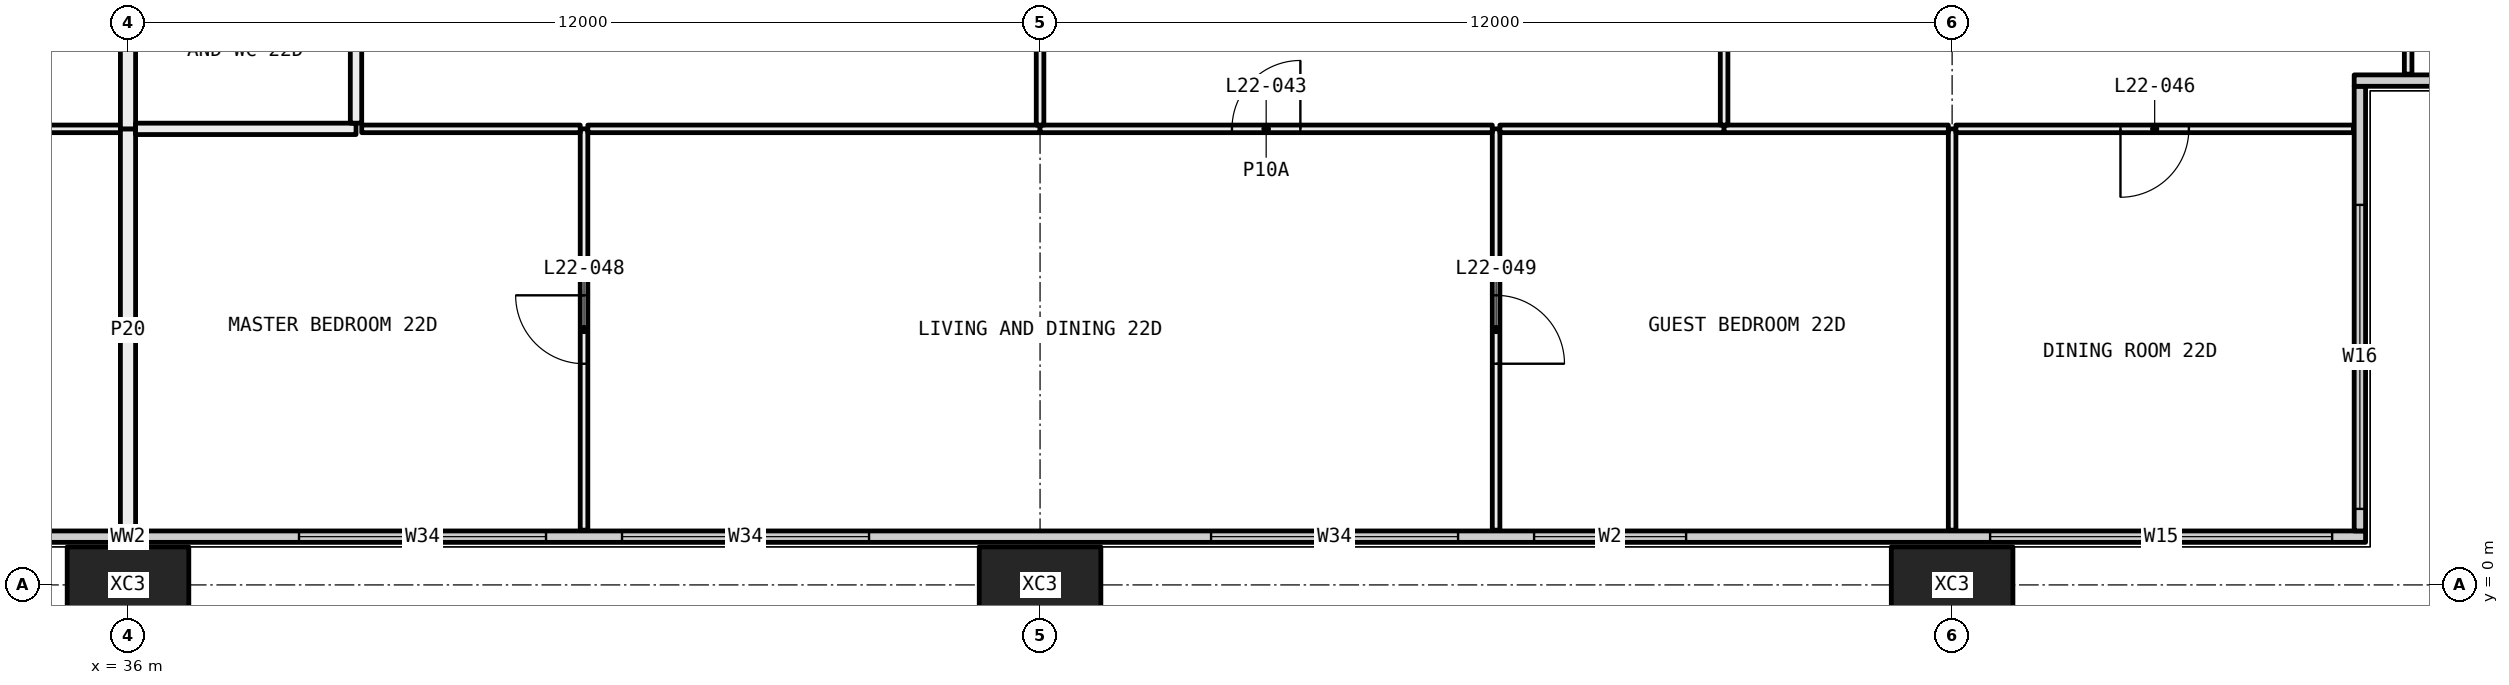
"""IFC4 building model, lengths in metres.
Left out: names, types, materials, properties, quantities, classifications, styles, units other than length and angle.
Written with IfcOpenShell. Run it as: python <this file> out.ifc"""

import sys

from ifc_helpers import new_model, si_unit, direction, frame, frame_2d, origin, origin_2d, place, context, subcontext, project, spatial, rectangle, hollow_rectangle, extrude, element, fill, save


model = new_model("IFC4")
c1 = context("Model", 3, precision=1e-05, world=origin(), true_north=direction((0.0, 1.0)))
c2 = subcontext(c1, "Body", "Model", "MODEL_VIEW")
j1 = project(units=[si_unit("LENGTHUNIT", "METRE"), si_unit("PLANEANGLEUNIT", "RADIAN")], contexts=[c1])
p1 = place(None, origin())
s1 = spatial("IfcSite", under=j1, at=p1, CompositionType="ELEMENT")
p2 = place(p1, origin())
s2 = spatial("IfcBuilding", under=s1, at=p2, CompositionType="ELEMENT")
p3 = place(p2, frame((0.0, 0.0, 88.65)))
s3 = spatial("IfcBuildingStorey", under=s2, at=p3, CompositionType="ELEMENT", Elevation=88.65)
for number, where, z_axis, x_axis in (
    (1, (36.0, 0.0, -0.4), (0.0, 0.0, 1.0), (1.0, 0.0, 0.0)),
    (2, (48.0, 0.0, -0.4), (0.0, 0.0, 1.0), (1.0, 0.0, 0.0)),
    (3, (60.0, 0.0, -0.4), (0.0, 0.0, 1.0), (1.0, 0.0, 0.0)),
):
    element("IfcColumn", number, at=place(p3, frame(where, z_axis=z_axis, x_axis=x_axis)), inside=s3, PredefinedType="COLUMN", context=c2, shape_type="SweptSolid", body=[
        extrude(hollow_rectangle(XDim=1.6, YDim=1.0, WallThickness=0.065, at=origin_2d()), origin(), (0.0, 0.0, 1.0), 3.45),
    ])
p4 = place(p3, frame((6.56, 0.635, 0.0), z_axis=(0.0, 0.0, 1.0), x_axis=(1.0, 0.0, 0.0)))
e4 = element("IfcWall", 4, at=p4, inside=s3, PredefinedType="ELEMENTEDWALL", context=c2, shape_type="SweptSolid", body=[
    extrude(rectangle(XDim=58.88, YDim=0.15, at=frame_2d((29.44, 0.0))), origin(), (0.0, 0.0, 1.0), 3.05),
])
p5 = place(p4, frame((0.44, 0.0, 0.45)))
e5 = element("IfcOpeningElement", 5, at=p5, cuts=e4, PredefinedType="OPENING", context=c2, shape_type="SweptSolid", body=[
    extrude(rectangle(XDim=4.5, YDim=2.55, at=frame_2d((2.25, 1.275))), frame((0.0, 0.085, 0.0), z_axis=(0.0, -1.0, 0.0), x_axis=(1.0, 0.0, 0.0)), (0.0, 0.0, 1.0), 0.17),
])
p6 = place(p4, frame((7.69, 0.0, 0.45)))
e6 = element("IfcOpeningElement", 6, at=p6, cuts=e4, PredefinedType="OPENING", context=c2, shape_type="SweptSolid", body=[
    extrude(rectangle(XDim=3.25, YDim=2.55, at=frame_2d((1.625, 1.275))), frame((0.0, 0.085, 0.0), z_axis=(0.0, -1.0, 0.0), x_axis=(1.0, 0.0, 0.0)), (0.0, 0.0, 1.0), 0.17),
])
p7 = place(p4, frame((11.94, 0.0, 0.45)))
e7 = element("IfcOpeningElement", 7, at=p7, cuts=e4, PredefinedType="OPENING", context=c2, shape_type="SweptSolid", body=[
    extrude(rectangle(XDim=3.25, YDim=2.55, at=frame_2d((1.625, 1.275))), frame((0.0, 0.085, 0.0), z_axis=(0.0, -1.0, 0.0), x_axis=(1.0, 0.0, 0.0)), (0.0, 0.0, 1.0), 0.17),
])
p8 = place(p4, frame((19.69, 0.0, 0.45)))
e8 = element("IfcOpeningElement", 8, at=p8, cuts=e4, PredefinedType="OPENING", context=c2, shape_type="SweptSolid", body=[
    extrude(rectangle(XDim=3.25, YDim=2.55, at=frame_2d((1.625, 1.275))), frame((0.0, 0.085, 0.0), z_axis=(0.0, -1.0, 0.0), x_axis=(1.0, 0.0, 0.0)), (0.0, 0.0, 1.0), 0.17),
])
p9 = place(p4, frame((23.94, 0.0, 0.45)))
e9 = element("IfcOpeningElement", 9, at=p9, cuts=e4, PredefinedType="OPENING", context=c2, shape_type="SweptSolid", body=[
    extrude(rectangle(XDim=2.0, YDim=2.55, at=frame_2d((1.0, 1.275))), frame((0.0, 0.085, 0.0), z_axis=(0.0, -1.0, 0.0), x_axis=(1.0, 0.0, 0.0)), (0.0, 0.0, 1.0), 0.17),
])
p10 = place(p4, frame((31.69, 0.0, 0.45)))
e10 = element("IfcOpeningElement", 10, at=p10, cuts=e4, PredefinedType="OPENING", context=c2, shape_type="SweptSolid", body=[
    extrude(rectangle(XDim=3.25, YDim=2.55, at=frame_2d((1.625, 1.275))), frame((0.0, 0.085, 0.0), z_axis=(0.0, -1.0, 0.0), x_axis=(1.0, 0.0, 0.0)), (0.0, 0.0, 1.0), 0.17),
])
p11 = place(p4, frame((35.94, 0.0, 0.45)))
e11 = element("IfcOpeningElement", 11, at=p11, cuts=e4, PredefinedType="OPENING", context=c2, shape_type="SweptSolid", body=[
    extrude(rectangle(XDim=3.25, YDim=2.55, at=frame_2d((1.625, 1.275))), frame((0.0, 0.085, 0.0), z_axis=(0.0, -1.0, 0.0), x_axis=(1.0, 0.0, 0.0)), (0.0, 0.0, 1.0), 0.17),
])
p12 = place(p4, frame((43.69, 0.0, 0.45)))
e12 = element("IfcOpeningElement", 12, at=p12, cuts=e4, PredefinedType="OPENING", context=c2, shape_type="SweptSolid", body=[
    extrude(rectangle(XDim=3.25, YDim=2.55, at=frame_2d((1.625, 1.275))), frame((0.0, 0.085, 0.0), z_axis=(0.0, -1.0, 0.0), x_axis=(1.0, 0.0, 0.0)), (0.0, 0.0, 1.0), 0.17),
])
p13 = place(p4, frame((47.94, 0.0, 0.45)))
e13 = element("IfcOpeningElement", 13, at=p13, cuts=e4, PredefinedType="OPENING", context=c2, shape_type="SweptSolid", body=[
    extrude(rectangle(XDim=2.0, YDim=2.55, at=frame_2d((1.0, 1.275))), frame((0.0, 0.085, 0.0), z_axis=(0.0, -1.0, 0.0), x_axis=(1.0, 0.0, 0.0)), (0.0, 0.0, 1.0), 0.17),
])
p14 = place(p4, frame((53.94, 0.0, 0.45)))
e14 = element("IfcOpeningElement", 14, at=p14, cuts=e4, PredefinedType="OPENING", context=c2, shape_type="SweptSolid", body=[
    extrude(rectangle(XDim=4.5, YDim=2.55, at=frame_2d((2.25, 1.275))), frame((0.0, 0.085, 0.0), z_axis=(0.0, -1.0, 0.0), x_axis=(1.0, 0.0, 0.0)), (0.0, 0.0, 1.0), 0.17),
])
p15 = place(p3, frame((65.365, 0.71, 0.0), z_axis=(0.0, 0.0, 1.0), x_axis=(0.0, 1.0, 0.0)))
e15 = element("IfcWall", 15, at=p15, inside=s3, PredefinedType="ELEMENTEDWALL", context=c2, shape_type="SweptSolid", body=[
    extrude(rectangle(XDim=5.85, YDim=0.15, at=frame_2d((2.925, 0.0))), origin(), (0.0, 0.0, 1.0), 3.05),
])
p16 = place(p15, frame((0.29, 0.0, 0.45)))
e16 = element("IfcOpeningElement", 16, at=p16, cuts=e15, PredefinedType="OPENING", context=c2, shape_type="SweptSolid", body=[
    extrude(rectangle(XDim=4.0, YDim=2.55, at=frame_2d((2.0, 1.275))), frame((0.0, 0.085, 0.0), z_axis=(0.0, -1.0, 0.0), x_axis=(1.0, 0.0, 0.0)), (0.0, 0.0, 1.0), 0.17),
])
p17 = place(p3, frame((65.29, 6.635, 0.0), z_axis=(0.0, 0.0, 1.0), x_axis=(1.0, 0.0, 0.0)))
e17 = element("IfcWall", 17, at=p17, inside=s3, PredefinedType="ELEMENTEDWALL", context=c2, shape_type="SweptSolid", body=[
    extrude(rectangle(XDim=6.15, YDim=0.15, at=frame_2d((3.075, 0.0))), origin(), (0.0, 0.0, 1.0), 3.05),
])
p18 = place(p17, frame((1.71, 0.0, 0.45)))
e18 = element("IfcOpeningElement", 18, at=p18, cuts=e17, PredefinedType="OPENING", context=c2, shape_type="SweptSolid", body=[
    extrude(rectangle(XDim=4.0, YDim=2.55, at=frame_2d((2.0, 1.275))), frame((0.0, 0.085, 0.0), z_axis=(0.0, -1.0, 0.0), x_axis=(1.0, 0.0, 0.0)), (0.0, 0.0, 1.0), 0.17),
])
p19 = place(p3, frame((35.9, 6.0, 0.0), z_axis=(0.0, 0.0, 1.0), x_axis=(-1.0, 0.0, 0.0)))
e19 = element("IfcWall", 19, at=p19, inside=s3, PredefinedType="PARTITIONING", context=c2, shape_type="SweptSolid", body=[
    extrude(rectangle(XDim=2.9, YDim=0.1, at=frame_2d((1.45, 0.0))), origin(), (0.0, 0.0, 1.0), 3.05),
])
p20 = place(p3, frame((36.0, 0.72, 0.0), z_axis=(0.0, 0.0, 1.0), x_axis=(0.0, 1.0, 0.0)))
e20 = element("IfcWall", 20, at=p20, inside=s3, PredefinedType="PARTITIONING", context=c2, shape_type="SweptSolid", body=[
    extrude(rectangle(XDim=5.28, YDim=0.2, at=frame_2d((2.64, 0.0))), origin(), (0.0, 0.0, 1.0), 2.45),
])
p21 = place(p3, frame((36.0, 6.0, 0.0), z_axis=(0.0, 0.0, 1.0), x_axis=(0.0, 1.0, 0.0)))
e21 = element("IfcWall", 21, at=p21, inside=s3, PredefinedType="PARTITIONING", context=c2, shape_type="SweptSolid", body=[
    extrude(rectangle(XDim=5.2, YDim=0.2, at=frame_2d((2.6, 0.0))), origin(), (0.0, 0.0, 1.0), 2.45),
])
p22 = place(p3, frame((42.0, 0.72, 0.0), z_axis=(0.0, 0.0, 1.0), x_axis=(0.0, 1.0, 0.0)))
e22 = element("IfcWall", 22, at=p22, inside=s3, PredefinedType="PARTITIONING", context=c2, shape_type="SweptSolid", body=[
    extrude(rectangle(XDim=5.28, YDim=0.1, at=frame_2d((2.64, 0.0))), origin(), (0.0, 0.0, 1.0), 3.05),
])
p23 = place(p22, frame((2.19, 0.0, 0.0)))
e23 = element("IfcOpeningElement", 23, at=p23, cuts=e22, PredefinedType="OPENING", context=c2, shape_type="SweptSolid", body=[
    extrude(rectangle(XDim=0.9, YDim=2.1, at=frame_2d((0.45, 1.05))), frame((0.0, 0.06, 0.0), z_axis=(0.0, -1.0, 0.0), x_axis=(1.0, 0.0, 0.0)), (0.0, 0.0, 1.0), 0.12),
])
p24 = place(p3, frame((39.0, 6.0, 0.0), z_axis=(0.0, 0.0, 1.0), x_axis=(-1.0, 0.0, 0.0)))
e24 = element("IfcWall", 24, at=p24, inside=s3, PredefinedType="PARTITIONING", context=c2, shape_type="SweptSolid", body=[
    extrude(rectangle(XDim=2.9, YDim=0.15, at=frame_2d((1.45, 0.0))), origin(), (0.0, 0.0, 1.0), 3.05),
])
p25 = place(p3, frame((41.95, 6.0, 0.0), z_axis=(0.0, 0.0, 1.0), x_axis=(-1.0, 0.0, 0.0)))
e25 = element("IfcWall", 25, at=p25, inside=s3, PredefinedType="PARTITIONING", context=c2, shape_type="SweptSolid", body=[
    extrude(rectangle(XDim=2.875, YDim=0.1, at=frame_2d((1.438, 0.0))), origin(), (0.0, 0.0, 1.0), 3.05),
])
p26 = place(p3, frame((54.0, 0.72, 0.0), z_axis=(0.0, 0.0, 1.0), x_axis=(0.0, 1.0, 0.0)))
e26 = element("IfcWall", 26, at=p26, inside=s3, PredefinedType="PARTITIONING", context=c2, shape_type="SweptSolid", body=[
    extrude(rectangle(XDim=5.28, YDim=0.1, at=frame_2d((2.64, 0.0))), origin(), (0.0, 0.0, 1.0), 3.05),
])
p27 = place(p26, frame((2.19, 0.0, 0.0)))
e27 = element("IfcOpeningElement", 27, at=p27, cuts=e26, PredefinedType="OPENING", context=c2, shape_type="SweptSolid", body=[
    extrude(rectangle(XDim=0.9, YDim=2.1, at=frame_2d((0.45, 1.05))), frame((0.0, 0.06, 0.0), z_axis=(0.0, -1.0, 0.0), x_axis=(1.0, 0.0, 0.0)), (0.0, 0.0, 1.0), 0.12),
])
p28 = place(p3, frame((48.0, 6.0, 0.0), z_axis=(0.0, 0.0, 1.0), x_axis=(-1.0, 0.0, 0.0)))
e28 = element("IfcWall", 28, at=p28, inside=s3, PredefinedType="PARTITIONING", context=c2, shape_type="SweptSolid", body=[
    extrude(rectangle(XDim=5.95, YDim=0.1, at=frame_2d((2.975, 0.0))), origin(), (0.0, 0.0, 1.0), 2.45),
])
p29 = place(p3, frame((53.95, 6.0, 0.0), z_axis=(0.0, 0.0, 1.0), x_axis=(-1.0, 0.0, 0.0)))
e29 = element("IfcWall", 29, at=p29, inside=s3, PredefinedType="PARTITIONING", context=c2, shape_type="SweptSolid", body=[
    extrude(rectangle(XDim=5.95, YDim=0.1, at=frame_2d((2.975, 0.0))), origin(), (0.0, 0.0, 1.0), 2.45),
])
p30 = place(p29, frame((2.525, 0.0, 0.0)))
e30 = element("IfcOpeningElement", 30, at=p30, cuts=e29, PredefinedType="OPENING", context=c2, shape_type="SweptSolid", body=[
    extrude(rectangle(XDim=0.9, YDim=2.1, at=frame_2d((0.45, 1.05))), frame((0.0, 0.06, 0.0), z_axis=(0.0, -1.0, 0.0), x_axis=(1.0, 0.0, 0.0)), (0.0, 0.0, 1.0), 0.12),
])
p31 = place(p3, frame((60.0, 0.72, 0.0), z_axis=(0.0, 0.0, 1.0), x_axis=(0.0, 1.0, 0.0)))
e31 = element("IfcWall", 31, at=p31, inside=s3, PredefinedType="PARTITIONING", context=c2, shape_type="SweptSolid", body=[
    extrude(rectangle(XDim=5.28, YDim=0.1, at=frame_2d((2.64, 0.0))), origin(), (0.0, 0.0, 1.0), 2.45),
])
p32 = place(p3, frame((57.0, 6.0, 0.0), z_axis=(0.0, 0.0, 1.0), x_axis=(-1.0, 0.0, 0.0)))
e32 = element("IfcWall", 32, at=p32, inside=s3, PredefinedType="PARTITIONING", context=c2, shape_type="SweptSolid", body=[
    extrude(rectangle(XDim=2.95, YDim=0.1, at=frame_2d((1.475, 0.0))), origin(), (0.0, 0.0, 1.0), 3.05),
])
p33 = place(p3, frame((59.95, 6.0, 0.0), z_axis=(0.0, 0.0, 1.0), x_axis=(-1.0, 0.0, 0.0)))
e33 = element("IfcWall", 33, at=p33, inside=s3, PredefinedType="PARTITIONING", context=c2, shape_type="SweptSolid", body=[
    extrude(rectangle(XDim=2.95, YDim=0.1, at=frame_2d((1.475, 0.0))), origin(), (0.0, 0.0, 1.0), 2.45),
])
p34 = place(p3, frame((65.28, 6.0, 0.0), z_axis=(0.0, 0.0, 1.0), x_axis=(-1.0, 0.0, 0.0)))
e34 = element("IfcWall", 34, at=p34, inside=s3, PredefinedType="PARTITIONING", context=c2, shape_type="SweptSolid", body=[
    extrude(rectangle(XDim=5.23, YDim=0.1, at=frame_2d((2.615, 0.0))), origin(), (0.0, 0.0, 1.0), 2.45),
])
p35 = place(p34, frame((2.165, 0.0, 0.0)))
e35 = element("IfcOpeningElement", 35, at=p35, cuts=e34, PredefinedType="OPENING", context=c2, shape_type="SweptSolid", body=[
    extrude(rectangle(XDim=0.9, YDim=2.1, at=frame_2d((0.45, 1.05))), frame((0.0, 0.06, 0.0), z_axis=(0.0, -1.0, 0.0), x_axis=(1.0, 0.0, 0.0)), (0.0, 0.0, 1.0), 0.12),
])
p36 = place(p3, frame((39.0, 6.075, 0.0), z_axis=(0.0, 0.0, 1.0), x_axis=(0.0, 1.0, 0.0)))
e36 = element("IfcWall", 36, at=p36, inside=s3, PredefinedType="PARTITIONING", context=c2, shape_type="SweptSolid", body=[
    extrude(rectangle(XDim=5.925, YDim=0.15, at=frame_2d((2.962, 0.0))), origin(), (0.0, 0.0, 1.0), 2.45),
])
p37 = place(p36, frame((2.512, 0.0, 0.0)))
e37 = element("IfcOpeningElement", 37, at=p37, cuts=e36, PredefinedType="OPENING", context=c2, shape_type="SweptSolid", body=[
    extrude(rectangle(XDim=0.9, YDim=2.1, at=frame_2d((0.45, 1.05))), frame((0.0, 0.085, 0.0), z_axis=(0.0, -1.0, 0.0), x_axis=(1.0, 0.0, 0.0)), (0.0, 0.0, 1.0), 0.17),
])
p38 = place(p3, frame((48.0, 6.05, 0.0), z_axis=(0.0, 0.0, 1.0), x_axis=(0.0, 1.0, 0.0)))
e38 = element("IfcWall", 38, at=p38, inside=s3, PredefinedType="PARTITIONING", context=c2, shape_type="SweptSolid", body=[
    extrude(rectangle(XDim=5.15, YDim=0.1, at=frame_2d((2.575, 0.0))), origin(), (0.0, 0.0, 1.0), 2.45),
])
p39 = place(p38, frame((2.125, 0.0, 0.0)))
e39 = element("IfcOpeningElement", 39, at=p39, cuts=e38, PredefinedType="OPENING", context=c2, shape_type="SweptSolid", body=[
    extrude(rectangle(XDim=0.9, YDim=2.1, at=frame_2d((0.45, 1.05))), frame((0.0, 0.06, 0.0), z_axis=(0.0, -1.0, 0.0), x_axis=(1.0, 0.0, 0.0)), (0.0, 0.0, 1.0), 0.12),
])
p40 = place(p3, frame((57.0, 6.05, 0.0), z_axis=(0.0, 0.0, 1.0), x_axis=(0.0, 1.0, 0.0)))
e40 = element("IfcWall", 40, at=p40, inside=s3, PredefinedType="PARTITIONING", context=c2, shape_type="SweptSolid", body=[
    extrude(rectangle(XDim=5.95, YDim=0.1, at=frame_2d((2.975, 0.0))), origin(), (0.0, 0.0, 1.0), 2.45),
])
p41 = place(p40, frame((2.525, 0.0, 0.0)))
e41 = element("IfcOpeningElement", 41, at=p41, cuts=e40, PredefinedType="OPENING", context=c2, shape_type="SweptSolid", body=[
    extrude(rectangle(XDim=0.9, YDim=2.1, at=frame_2d((0.45, 1.05))), frame((0.0, 0.06, 0.0), z_axis=(0.0, -1.0, 0.0), x_axis=(1.0, 0.0, 0.0)), (0.0, 0.0, 1.0), 0.12),
])
p42 = place(p3, frame((66.0, 6.72, 0.0), z_axis=(0.0, 0.0, 1.0), x_axis=(0.0, 1.0, 0.0)))
e42 = element("IfcWall", 42, at=p42, inside=s3, PredefinedType="PARTITIONING", context=c2, shape_type="SweptSolid", body=[
    extrude(rectangle(XDim=5.205, YDim=0.1, at=frame_2d((2.603, 0.0))), origin(), (0.0, 0.0, 1.0), 2.45),
])
p43 = place(p42, frame((2.153, 0.0, 0.0)))
e43 = element("IfcOpeningElement", 43, at=p43, cuts=e42, PredefinedType="OPENING", context=c2, shape_type="SweptSolid", body=[
    extrude(rectangle(XDim=0.9, YDim=2.1, at=frame_2d((0.45, 1.05))), frame((0.0, 0.06, 0.0), z_axis=(0.0, -1.0, 0.0), x_axis=(1.0, 0.0, 0.0)), (0.0, 0.0, 1.0), 0.12),
])
p44 = place(p10, origin())
e44 = element("IfcWindow", 44, at=p44, inside=s3, PartitioningType="SINGLE_PANEL", PredefinedType="WINDOW", context=c2, shape_type="SweptSolid", body=[
    extrude(rectangle(XDim=3.25, YDim=2.55, at=frame_2d((1.625, 1.275))), frame((0.0, 0.03, 0.0), z_axis=(0.0, -1.0, 0.0), x_axis=(1.0, 0.0, 0.0)), (0.0, 0.0, 1.0), 0.06),
])
fill(e10, e44)
p45 = place(p11, origin())
e45 = element("IfcWindow", 45, at=p45, inside=s3, PartitioningType="SINGLE_PANEL", PredefinedType="WINDOW", context=c2, shape_type="SweptSolid", body=[
    extrude(rectangle(XDim=3.25, YDim=2.55, at=frame_2d((1.625, 1.275))), frame((0.0, 0.03, 0.0), z_axis=(0.0, -1.0, 0.0), x_axis=(1.0, 0.0, 0.0)), (0.0, 0.0, 1.0), 0.06),
])
fill(e11, e45)
p46 = place(p12, origin())
e46 = element("IfcWindow", 46, at=p46, inside=s3, PartitioningType="SINGLE_PANEL", PredefinedType="WINDOW", context=c2, shape_type="SweptSolid", body=[
    extrude(rectangle(XDim=3.25, YDim=2.55, at=frame_2d((1.625, 1.275))), frame((0.0, 0.03, 0.0), z_axis=(0.0, -1.0, 0.0), x_axis=(1.0, 0.0, 0.0)), (0.0, 0.0, 1.0), 0.06),
])
fill(e12, e46)
p47 = place(p13, origin())
e47 = element("IfcWindow", 47, at=p47, inside=s3, PartitioningType="SINGLE_PANEL", PredefinedType="WINDOW", context=c2, shape_type="SweptSolid", body=[
    extrude(rectangle(XDim=2.0, YDim=2.55, at=frame_2d((1.0, 1.275))), frame((0.0, 0.03, 0.0), z_axis=(0.0, -1.0, 0.0), x_axis=(1.0, 0.0, 0.0)), (0.0, 0.0, 1.0), 0.06),
])
fill(e13, e47)
p48 = place(p14, origin())
e48 = element("IfcWindow", 48, at=p48, inside=s3, PartitioningType="SINGLE_PANEL", PredefinedType="WINDOW", context=c2, shape_type="SweptSolid", body=[
    extrude(rectangle(XDim=4.5, YDim=2.55, at=frame_2d((2.25, 1.275))), frame((0.0, 0.03, 0.0), z_axis=(0.0, -1.0, 0.0), x_axis=(1.0, 0.0, 0.0)), (0.0, 0.0, 1.0), 0.06),
])
fill(e14, e48)
p49 = place(p16, origin())
e49 = element("IfcWindow", 49, at=p49, inside=s3, PartitioningType="SINGLE_PANEL", PredefinedType="WINDOW", context=c2, shape_type="SweptSolid", body=[
    extrude(rectangle(XDim=4.0, YDim=2.55, at=frame_2d((2.0, 1.275))), frame((0.0, 0.03, 0.0), z_axis=(0.0, -1.0, 0.0), x_axis=(1.0, 0.0, 0.0)), (0.0, 0.0, 1.0), 0.06),
])
fill(e16, e49)
p50 = place(p30, frame((0.9, 0.0, 0.0), x_axis=(-1.0, 0.0, 0.0)))
e50 = element("IfcDoor", 50, at=p50, inside=s3, OperationType="SINGLE_SWING_LEFT", PredefinedType="DOOR", context=c2, shape_type="SweptSolid", body=[
    extrude(rectangle(XDim=0.9, YDim=2.1, at=frame_2d((0.45, 1.05))), frame((0.0, 0.025, 0.0), z_axis=(0.0, -1.0, 0.0), x_axis=(1.0, 0.0, 0.0)), (0.0, 0.0, 1.0), 0.05),
])
fill(e30, e50)
p51 = place(p35, origin())
e51 = element("IfcDoor", 51, at=p51, inside=s3, OperationType="SINGLE_SWING_LEFT", PredefinedType="DOOR", context=c2, shape_type="SweptSolid", body=[
    extrude(rectangle(XDim=0.9, YDim=2.1, at=frame_2d((0.45, 1.05))), frame((0.0, 0.025, 0.0), z_axis=(0.0, -1.0, 0.0), x_axis=(1.0, 0.0, 0.0)), (0.0, 0.0, 1.0), 0.05),
])
fill(e35, e51)
p52 = place(p23, origin())
e52 = element("IfcDoor", 52, at=p52, inside=s3, OperationType="SINGLE_SWING_LEFT", PredefinedType="DOOR", context=c2, shape_type="SweptSolid", body=[
    extrude(rectangle(XDim=0.9, YDim=2.1, at=frame_2d((0.45, 1.05))), frame((0.0, 0.025, 0.0), z_axis=(0.0, -1.0, 0.0), x_axis=(1.0, 0.0, 0.0)), (0.0, 0.0, 1.0), 0.05),
])
fill(e23, e52)
p53 = place(p27, frame((0.9, 0.0, 0.0), x_axis=(-1.0, 0.0, 0.0)))
e53 = element("IfcDoor", 53, at=p53, inside=s3, OperationType="SINGLE_SWING_LEFT", PredefinedType="DOOR", context=c2, shape_type="SweptSolid", body=[
    extrude(rectangle(XDim=0.9, YDim=2.1, at=frame_2d((0.45, 1.05))), frame((0.0, 0.025, 0.0), z_axis=(0.0, -1.0, 0.0), x_axis=(1.0, 0.0, 0.0)), (0.0, 0.0, 1.0), 0.05),
])
fill(e27, e53)
save(model, sys.argv[1])
